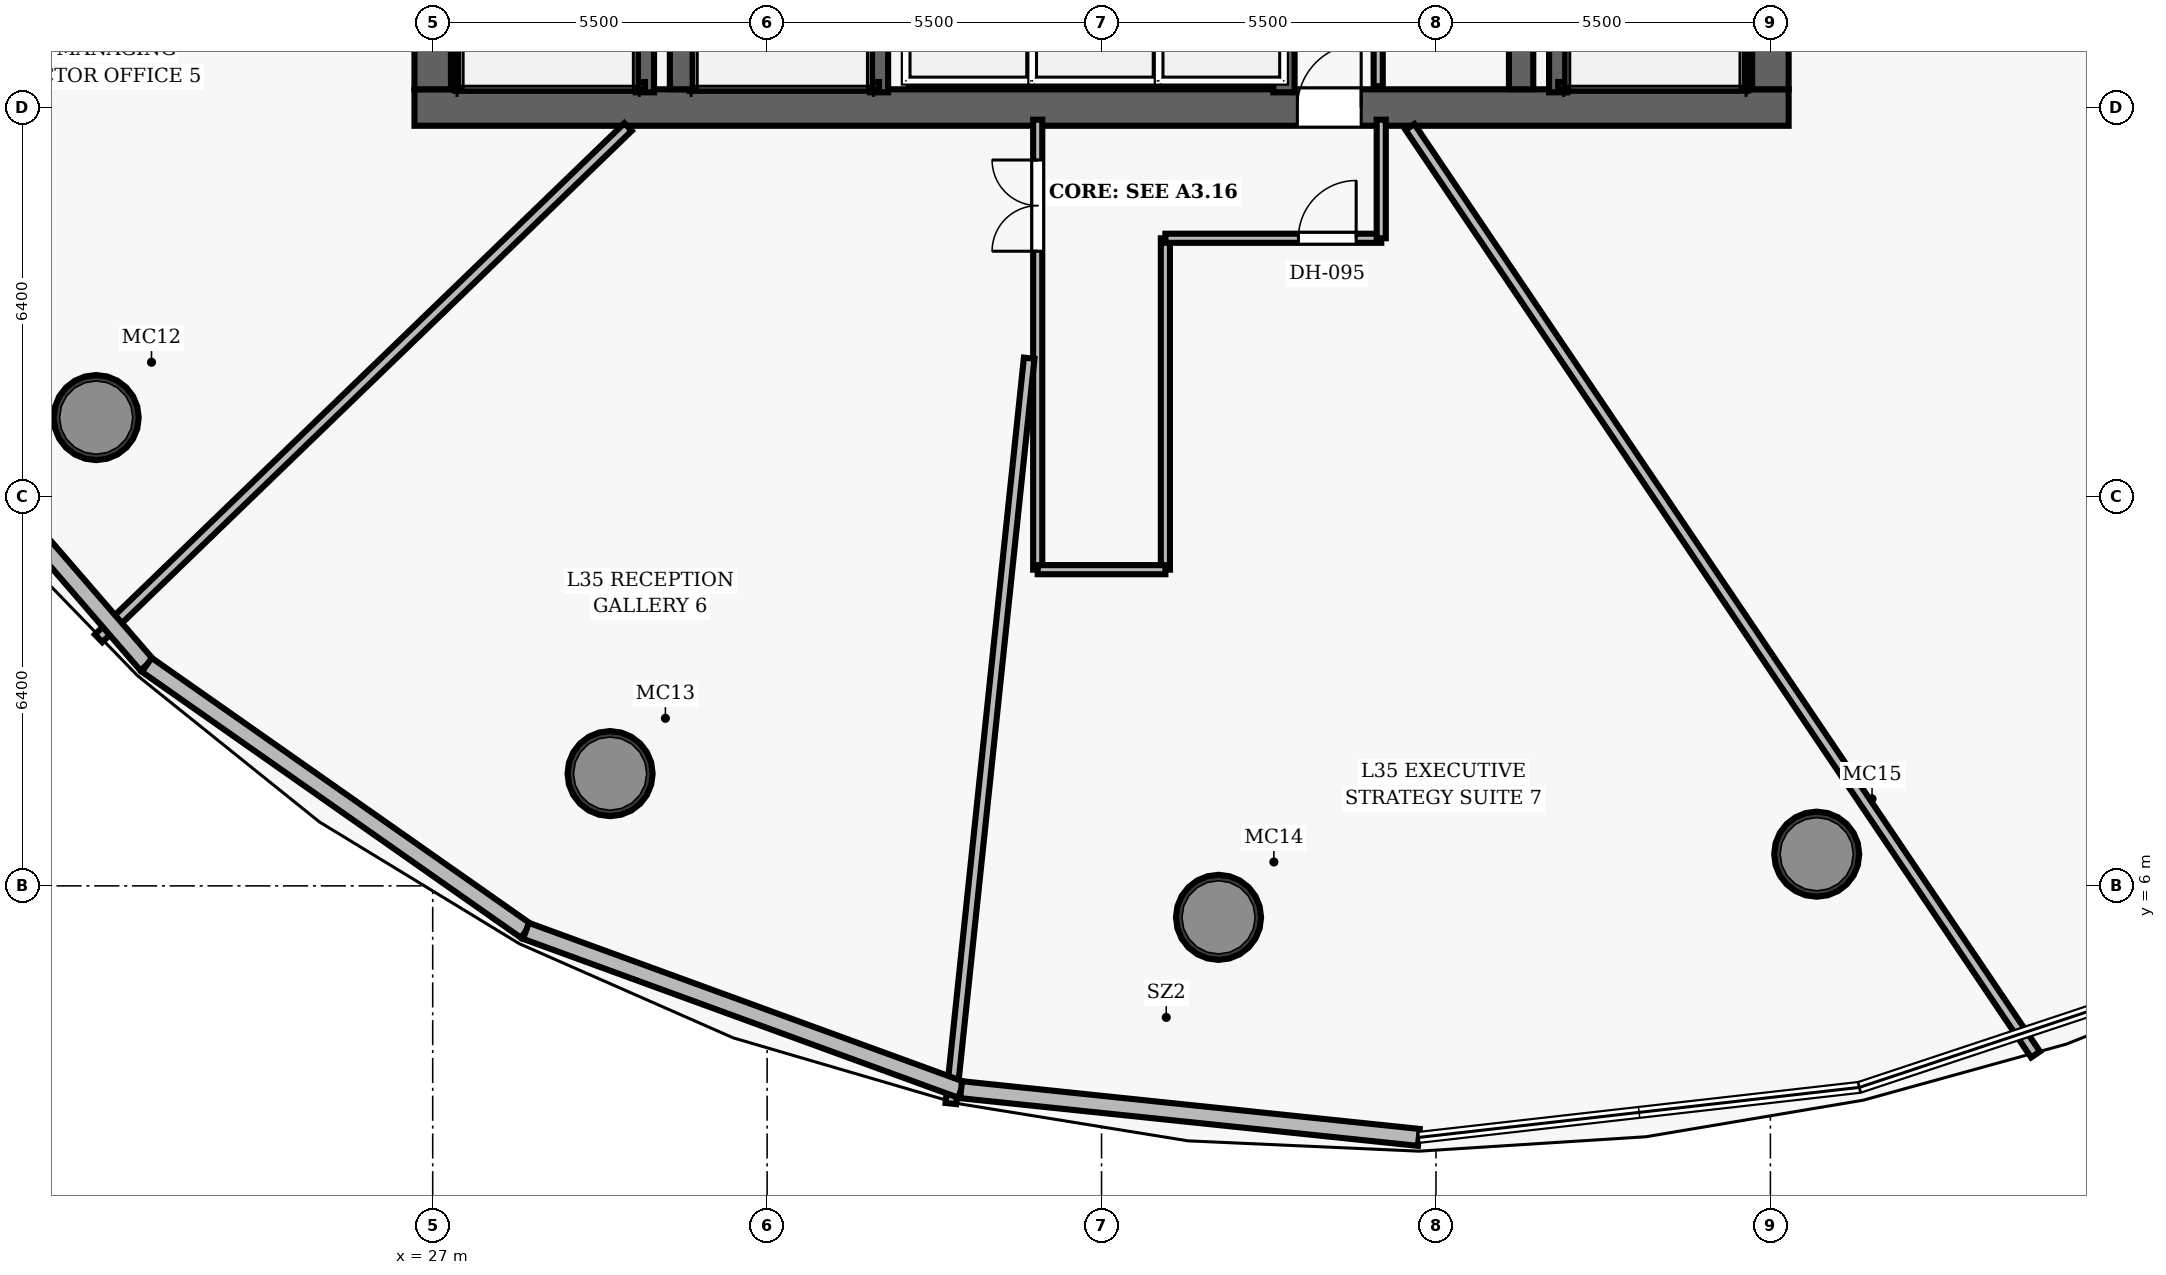
"""IFC4 building model, lengths in metres.
Left out: names, types, materials, properties, quantities, classifications, styles, units other than length and angle.
Written with IfcOpenShell. Run it as: python <this file> out.ifc"""

import sys

from ifc_helpers import new_model, si_unit, direction, frame, frame_2d, origin, origin_2d, place, context, subcontext, project, spatial, rectangle, hollow_circle, extrude, element, fill, save


model = new_model("IFC4")
c1 = context("Model", 3, precision=1e-05, world=origin(), true_north=direction((0.0, 1.0)))
c2 = subcontext(c1, "Body", "Model", "MODEL_VIEW")
j1 = project(units=[si_unit("LENGTHUNIT", "METRE"), si_unit("PLANEANGLEUNIT", "RADIAN")], contexts=[c1])
p1 = place(None, origin())
s1 = spatial("IfcSite", under=j1, at=p1, CompositionType="ELEMENT")
p2 = place(p1, origin())
s2 = spatial("IfcBuilding", under=s1, at=p2, CompositionType="ELEMENT")
p3 = place(p2, frame((0.0, 0.0, 141.3)))
s3 = spatial("IfcBuildingStorey", under=s2, at=p3, CompositionType="ELEMENT", Elevation=141.3)
p4 = place(p3, frame((26.7, 18.8, 0.0), z_axis=(0.0, 0.0, 1.0), x_axis=(1.0, 0.0, 0.0)))
e1 = element("IfcWall", 1, at=p4, inside=s3, PredefinedType="SHEAR", context=c2, shape_type="SweptSolid", body=[
    extrude(rectangle(XDim=22.6, YDim=0.6, at=frame_2d((11.3, 0.0))), origin(), (0.0, 0.0, 1.0), 3.5),
])
p5 = place(p4, frame((14.52, 0.0, 0.0)))
e2 = element("IfcOpeningElement", 2, at=p5, cuts=e1, PredefinedType="OPENING", context=c2, shape_type="SweptSolid", body=[
    extrude(rectangle(XDim=1.05, YDim=2.15, at=frame_2d((0.525, 1.075))), frame((0.0, 0.31, 0.0), z_axis=(0.0, -1.0, 0.0), x_axis=(1.0, 0.0, 0.0)), (0.0, 0.0, 1.0), 0.62),
])
p6 = place(p3, frame((27.0, 19.1, 0.0), z_axis=(0.0, 0.0, 1.0), x_axis=(0.0, 1.0, 0.0)))
e3 = element("IfcWall", 3, at=p6, inside=s3, PredefinedType="SHEAR", context=c2, shape_type="SweptSolid", body=[
    extrude(rectangle(XDim=13.8, YDim=0.6, at=frame_2d((6.9, 0.0))), origin(), (0.0, 0.0, 1.0), 3.5),
])
p7 = place(p6, frame((8.2, 0.0, 0.0)))
e4 = element("IfcOpeningElement", 4, at=p7, cuts=e3, PredefinedType="OPENING", context=c2, shape_type="SweptSolid", body=[
    extrude(rectangle(XDim=1.05, YDim=2.15, at=frame_2d((0.525, 1.075))), frame((0.0, 0.31, 0.0), z_axis=(0.0, -1.0, 0.0), x_axis=(1.0, 0.0, 0.0)), (0.0, 0.0, 1.0), 0.62),
])
p8 = place(p3, frame((49.0, 19.1, 0.0), z_axis=(0.0, 0.0, 1.0), x_axis=(0.0, 1.0, 0.0)))
e5 = element("IfcWall", 5, at=p8, inside=s3, PredefinedType="SHEAR", context=c2, shape_type="SweptSolid", body=[
    extrude(rectangle(XDim=13.8, YDim=0.6, at=frame_2d((6.9, 0.0))), origin(), (0.0, 0.0, 1.0), 3.5),
])
p9 = place(p8, frame((8.2, 0.0, 0.0)))
e6 = element("IfcOpeningElement", 6, at=p9, cuts=e5, PredefinedType="OPENING", context=c2, shape_type="SweptSolid", body=[
    extrude(rectangle(XDim=1.05, YDim=2.15, at=frame_2d((0.525, 1.075))), frame((0.0, 0.31, 0.0), z_axis=(0.0, -1.0, 0.0), x_axis=(1.0, 0.0, 0.0)), (0.0, 0.0, 1.0), 0.62),
])
for number, where, z_axis, x_axis in (
    (7, (31.1, 19.1, 0.0), (0.0, 0.0, 1.0), (0.0, 1.0, 0.0)),
    (8, (44.9, 19.1, 0.0), (0.0, 0.0, 1.0), (0.0, 1.0, 0.0)),
):
    element("IfcWall", number, at=place(p3, frame(where, z_axis=z_axis, x_axis=x_axis)), inside=s3, PredefinedType="SHEAR", context=c2, shape_type="SweptSolid", body=[
        extrude(rectangle(XDim=13.8, YDim=0.4, at=frame_2d((6.9, 0.0))), origin(), (0.0, 0.0, 1.0), 3.5),
    ])
for number, where, z_axis, x_axis in (
    (9, (21.465, 13.701, 0.0), (0.0, 0.0, 1.0), (1.0, 0.0, 0.0)),
    (10, (29.917, 7.846, 0.0), (0.0, 0.0, 1.0), (1.0, 0.0, 0.0)),
    (11, (39.924, 5.483, 0.0), (0.0, 0.0, 1.0), (1.0, 0.0, 0.0)),
    (12, (49.762, 6.521, 0.0), (0.0, 0.0, 1.0), (1.0, 0.0, 0.0)),
):
    element("IfcColumn", number, at=place(p3, frame(where, z_axis=z_axis, x_axis=x_axis)), inside=s3, PredefinedType="COLUMN", context=c2, shape_type="SweptSolid", body=[
        extrude(hollow_circle(Radius=0.7, WallThickness=0.055, at=origin_2d()), origin(), (0.0, 0.0, 1.0), 3.5),
    ])
p10 = place(p3, frame((30.49, 19.05, 0.0), z_axis=(0.0, 0.0, 1.0), x_axis=(0.0, 1.0, 0.0)))
e13 = element("IfcWall", 13, at=p10, inside=s3, PredefinedType="SHEAR", context=c2, shape_type="SweptSolid", body=[
    extrude(rectangle(XDim=7.5, YDim=0.3, at=frame_2d((3.75, 0.0))), origin(), (0.0, 0.0, 1.0), 3.5),
])
p11 = place(p3, frame((27.395, 19.1, 0.0), z_axis=(0.0, 0.0, 1.0), x_axis=(0.0, 1.0, 0.0)))
e14 = element("IfcWall", 14, at=p11, inside=s3, PredefinedType="SHEAR", context=c2, shape_type="SweptSolid", body=[
    extrude(rectangle(XDim=7.45, YDim=0.12, at=frame_2d((3.725, 0.0))), origin(), (0.0, 0.0, 1.0), 3.5),
])
p12 = place(p3, frame((27.395, 19.16, 0.0), z_axis=(0.0, 0.0, 1.0), x_axis=(1.0, 0.0, 0.0)))
e15 = element("IfcWall", 15, at=p12, inside=s3, PredefinedType="SHEAR", context=c2, shape_type="SweptSolid", body=[
    extrude(rectangle(XDim=3.095, YDim=0.12, at=frame_2d((1.547, 0.0))), origin(), (0.0, 0.0, 1.0), 3.5),
])
p13 = place(p3, frame((45.51, 19.05, 0.0), z_axis=(0.0, 0.0, 1.0), x_axis=(0.0, 1.0, 0.0)))
e16 = element("IfcWall", 16, at=p13, inside=s3, PredefinedType="SHEAR", context=c2, shape_type="SweptSolid", body=[
    extrude(rectangle(XDim=7.5, YDim=0.3, at=frame_2d((3.75, 0.0))), origin(), (0.0, 0.0, 1.0), 3.5),
])
p14 = place(p3, frame((48.605, 19.1, 0.0), z_axis=(0.0, 0.0, 1.0), x_axis=(0.0, 1.0, 0.0)))
e17 = element("IfcWall", 17, at=p14, inside=s3, PredefinedType="SHEAR", context=c2, shape_type="SweptSolid", body=[
    extrude(rectangle(XDim=7.45, YDim=0.12, at=frame_2d((3.725, 0.0))), origin(), (0.0, 0.0, 1.0), 3.5),
])
p15 = place(p3, frame((45.51, 19.16, 0.0), z_axis=(0.0, 0.0, 1.0), x_axis=(1.0, 0.0, 0.0)))
e18 = element("IfcWall", 18, at=p15, inside=s3, PredefinedType="SHEAR", context=c2, shape_type="SweptSolid", body=[
    extrude(rectangle(XDim=3.095, YDim=0.12, at=frame_2d((1.547, 0.0))), origin(), (0.0, 0.0, 1.0), 3.5),
])
p16 = place(p3, frame((34.34, 19.05, 0.0), z_axis=(0.0, 0.0, 1.0), x_axis=(0.0, 1.0, 0.0)))
e19 = element("IfcWall", 19, at=p16, inside=s3, PredefinedType="SHEAR", context=c2, shape_type="SweptSolid", body=[
    extrude(rectangle(XDim=7.5, YDim=0.3, at=frame_2d((3.75, 0.0))), origin(), (0.0, 0.0, 1.0), 3.5),
])
p17 = place(p3, frame((31.3, 19.16, 0.0), z_axis=(0.0, 0.0, 1.0), x_axis=(1.0, 0.0, 0.0)))
e20 = element("IfcWall", 20, at=p17, inside=s3, PredefinedType="SHEAR", context=c2, shape_type="SweptSolid", body=[
    extrude(rectangle(XDim=3.04, YDim=0.12, at=frame_2d((1.52, 0.0))), origin(), (0.0, 0.0, 1.0), 3.5),
])
p18 = place(p3, frame((41.0, 19.05, 0.0), z_axis=(0.0, 0.0, 1.0), x_axis=(0.0, 1.0, 0.0)))
e21 = element("IfcWall", 21, at=p18, inside=s3, PredefinedType="SHEAR", context=c2, shape_type="SweptSolid", body=[
    extrude(rectangle(XDim=2.08, YDim=0.35, at=frame_2d((1.04, 0.0))), origin(), (0.0, 0.0, 1.0), 2.675),
])
p19 = place(p3, frame((42.55, 19.15, 0.0), z_axis=(0.0, 0.0, 1.0), x_axis=(0.0, 1.0, 0.0)))
e22 = element("IfcWall", 22, at=p19, inside=s3, PredefinedType="PARTITIONING", context=c2, shape_type="SweptSolid", body=[
    extrude(rectangle(XDim=2.75, YDim=0.15, at=frame_2d((1.375, 0.0))), origin(), (0.0, 0.0, 1.0), 2.675),
])
p20 = place(p19, frame((0.7, 0.0, 0.0)))
e23 = element("IfcOpeningElement", 23, at=p20, cuts=e22, PredefinedType="OPENING", context=c2, shape_type="SweptSolid", body=[
    extrude(rectangle(XDim=0.85, YDim=2.1, at=frame_2d((0.425, 1.05))), frame((0.0, 0.085, 0.0), z_axis=(0.0, -1.0, 0.0), x_axis=(1.0, 0.0, 0.0)), (0.0, 0.0, 1.0), 0.17),
])
p21 = place(p3, frame((36.95, 11.2, 0.0), z_axis=(0.0, 0.0, 1.0), x_axis=(0.0, 1.0, 0.0)))
e24 = element("IfcWall", 24, at=p21, inside=s3, PredefinedType="PARTITIONING", context=c2, shape_type="SweptSolid", body=[
    extrude(rectangle(XDim=7.4, YDim=0.15, at=frame_2d((3.7, 0.0))), origin(), (0.0, 0.0, 1.0), 2.675),
])
p22 = place(p21, frame((5.237, 0.0, 0.0)))
e25 = element("IfcOpeningElement", 25, at=p22, cuts=e24, PredefinedType="OPENING", context=c2, shape_type="SweptSolid", body=[
    extrude(rectangle(XDim=1.5, YDim=2.2, at=frame_2d((0.75, 1.1))), frame((0.0, 0.085, 0.0), z_axis=(0.0, -1.0, 0.0), x_axis=(1.0, 0.0, 0.0)), (0.0, 0.0, 1.0), 0.17),
])
p23 = place(p3, frame((39.05, 11.2, 0.0), z_axis=(0.0, 0.0, 1.0), x_axis=(0.0, 1.0, 0.0)))
e26 = element("IfcWall", 26, at=p23, inside=s3, PredefinedType="PARTITIONING", context=c2, shape_type="SweptSolid", body=[
    extrude(rectangle(XDim=5.45, YDim=0.15, at=frame_2d((2.725, 0.0))), origin(), (0.0, 0.0, 1.0), 2.675),
])
p24 = place(p3, frame((39.05, 16.65, 0.0), z_axis=(0.0, 0.0, 1.0), x_axis=(1.0, 0.0, 0.0)))
e27 = element("IfcWall", 27, at=p24, inside=s3, PredefinedType="PARTITIONING", context=c2, shape_type="SweptSolid", body=[
    extrude(rectangle(XDim=3.55, YDim=0.15, at=frame_2d((1.775, 0.0))), origin(), (0.0, 0.0, 1.0), 2.675),
])
p25 = place(p24, frame((2.188, 0.0, 0.0)))
e28 = element("IfcOpeningElement", 28, at=p25, cuts=e27, PredefinedType="OPENING", context=c2, shape_type="SweptSolid", body=[
    extrude(rectangle(XDim=0.95, YDim=2.15, at=frame_2d((0.475, 1.075))), frame((0.0, 0.085, 0.0), z_axis=(0.0, -1.0, 0.0), x_axis=(1.0, 0.0, 0.0)), (0.0, 0.0, 1.0), 0.17),
])
p26 = place(p3, frame((42.6, 16.65, 0.0), z_axis=(0.0, 0.0, 1.0), x_axis=(0.0, 1.0, 0.0)))
e29 = element("IfcWall", 29, at=p26, inside=s3, PredefinedType="PARTITIONING", context=c2, shape_type="SweptSolid", body=[
    extrude(rectangle(XDim=1.95, YDim=0.15, at=frame_2d((0.975, 0.0))), origin(), (0.0, 0.0, 1.0), 2.675),
])
p27 = place(p3, frame((36.95, 11.2, 0.0), z_axis=(0.0, 0.0, 1.0), x_axis=(1.0, 0.0, 0.0)))
e30 = element("IfcWall", 30, at=p27, inside=s3, PredefinedType="PARTITIONING", context=c2, shape_type="SweptSolid", body=[
    extrude(rectangle(XDim=2.1, YDim=0.15, at=frame_2d((1.05, 0.0))), origin(), (0.0, 0.0, 1.0), 2.675),
])
p28 = place(p3, frame((30.213, 18.48, 0.0), z_axis=(0.0, 0.0, 1.0), x_axis=(-0.719342032924, -0.694656058542, 0.0)))
e31 = element("IfcWall", 31, at=p28, inside=s3, PredefinedType="PARTITIONING", context=c2, shape_type="SweptSolid", body=[
    extrude(rectangle(XDim=12.105, YDim=0.175, at=frame_2d((6.053, 0.0))), origin(), (0.0, 0.0, 1.0), 2.675),
])
p29 = place(p3, frame((36.81, 14.678, 0.0), z_axis=(0.0, 0.0, 1.0), x_axis=(-0.104529083551, -0.994521830174, 0.0)))
e32 = element("IfcWall", 32, at=p29, inside=s3, PredefinedType="PARTITIONING", context=c2, shape_type="SweptSolid", body=[
    extrude(rectangle(XDim=12.325, YDim=0.175, at=frame_2d((6.163, 0.0))), origin(), (0.0, 0.0, 1.0), 2.675),
])
p30 = place(p3, frame((43.072, 18.48, 0.0), z_axis=(0.0, 0.0, 1.0), x_axis=(0.559193636848, -0.829037077885, 0.0)))
e33 = element("IfcWall", 33, at=p30, inside=s3, PredefinedType="PARTITIONING", context=c2, shape_type="SweptSolid", body=[
    extrude(rectangle(XDim=18.398, YDim=0.175, at=frame_2d((9.199, 0.0))), origin(), (0.0, 0.0, 1.0), 2.675),
])
p31 = place(p3, frame((49.32, 22.754, 0.0), z_axis=(0.0, 0.0, 1.0), x_axis=(0.961265285636, -0.275624836744, 0.0)))
e34 = element("IfcWall", 34, at=p31, inside=s3, PredefinedType="PARTITIONING", context=c2, shape_type="SweptSolid", body=[
    extrude(rectangle(XDim=18.052, YDim=0.175, at=frame_2d((9.026, 0.0))), origin(), (0.0, 0.0, 1.0), 2.675),
])
p32 = place(p3, frame((22.298, 9.635, 0.0), z_axis=(0.0, 0.0, 1.0), x_axis=(-0.654063156919, 0.756439942601, 0.0)))
e35 = element("IfcWall", 35, at=p32, inside=s3, PredefinedType="SOLIDWALL", context=c2, shape_type="SweptSolid", body=[
    extrude(rectangle(XDim=7.569, YDim=0.28, at=frame_2d((3.785, 0.0))), origin(), (0.0, 0.0, 1.0), 3.26),
])
p33 = place(p3, frame((28.534, 5.26, 0.0), z_axis=(0.0, 0.0, 1.0), x_axis=(-0.818671417034, 0.574262231852, 0.0)))
e36 = element("IfcWall", 36, at=p33, inside=s3, PredefinedType="SOLIDWALL", context=c2, shape_type="SweptSolid", body=[
    extrude(rectangle(XDim=7.618, YDim=0.28, at=frame_2d((3.809, 0.0))), origin(), (0.0, 0.0, 1.0), 3.26),
])
p34 = place(p3, frame((35.69, 2.648, 0.0), z_axis=(0.0, 0.0, 1.0), x_axis=(-0.939382883035, 0.342869944821, 0.0)))
e37 = element("IfcWall", 37, at=p34, inside=s3, PredefinedType="SOLIDWALL", context=c2, shape_type="SweptSolid", body=[
    extrude(rectangle(XDim=7.617, YDim=0.28, at=frame_2d((3.809, 0.0))), origin(), (0.0, 0.0, 1.0), 3.26),
])
p35 = place(p3, frame((43.218, 1.864, 0.0), z_axis=(0.0, 0.0, 1.0), x_axis=(-0.994612036357, 0.103667242342, 0.0)))
e38 = element("IfcWall", 38, at=p35, inside=s3, PredefinedType="SOLIDWALL", context=c2, shape_type="SweptSolid", body=[
    extrude(rectangle(XDim=7.569, YDim=0.28, at=frame_2d((3.785, 0.0))), origin(), (0.0, 0.0, 1.0), 3.26),
])
p36 = place(p5, origin())
e39 = element("IfcDoor", 39, at=p36, inside=s3, OperationType="SINGLE_SWING_RIGHT", PredefinedType="DOOR", context=c2, shape_type="SweptSolid", body=[
    extrude(rectangle(XDim=1.05, YDim=2.15, at=frame_2d((0.525, 1.075))), frame((0.0, 0.025, 0.0), z_axis=(0.0, -1.0, 0.0), x_axis=(1.0, 0.0, 0.0)), (0.0, 0.0, 1.0), 0.05),
])
fill(e2, e39)
p37 = place(p22, origin())
e40 = element("IfcDoor", 40, at=p37, inside=s3, OperationType="DOUBLE_DOOR_SINGLE_SWING", PredefinedType="DOOR", context=c2, shape_type="SweptSolid", body=[
    extrude(rectangle(XDim=1.5, YDim=2.2, at=frame_2d((0.75, 1.1))), frame((0.0, 0.025, 0.0), z_axis=(0.0, -1.0, 0.0), x_axis=(1.0, 0.0, 0.0)), (0.0, 0.0, 1.0), 0.05),
])
fill(e25, e40)
p38 = place(p25, origin())
e41 = element("IfcDoor", 41, at=p38, inside=s3, OperationType="SINGLE_SWING_RIGHT", PredefinedType="DOOR", context=c2, shape_type="SweptSolid", body=[
    extrude(rectangle(XDim=0.95, YDim=2.15, at=frame_2d((0.475, 1.075))), frame((0.0, 0.025, 0.0), z_axis=(0.0, -1.0, 0.0), x_axis=(1.0, 0.0, 0.0)), (0.0, 0.0, 1.0), 0.05),
])
fill(e28, e41)
save(model, sys.argv[1])
